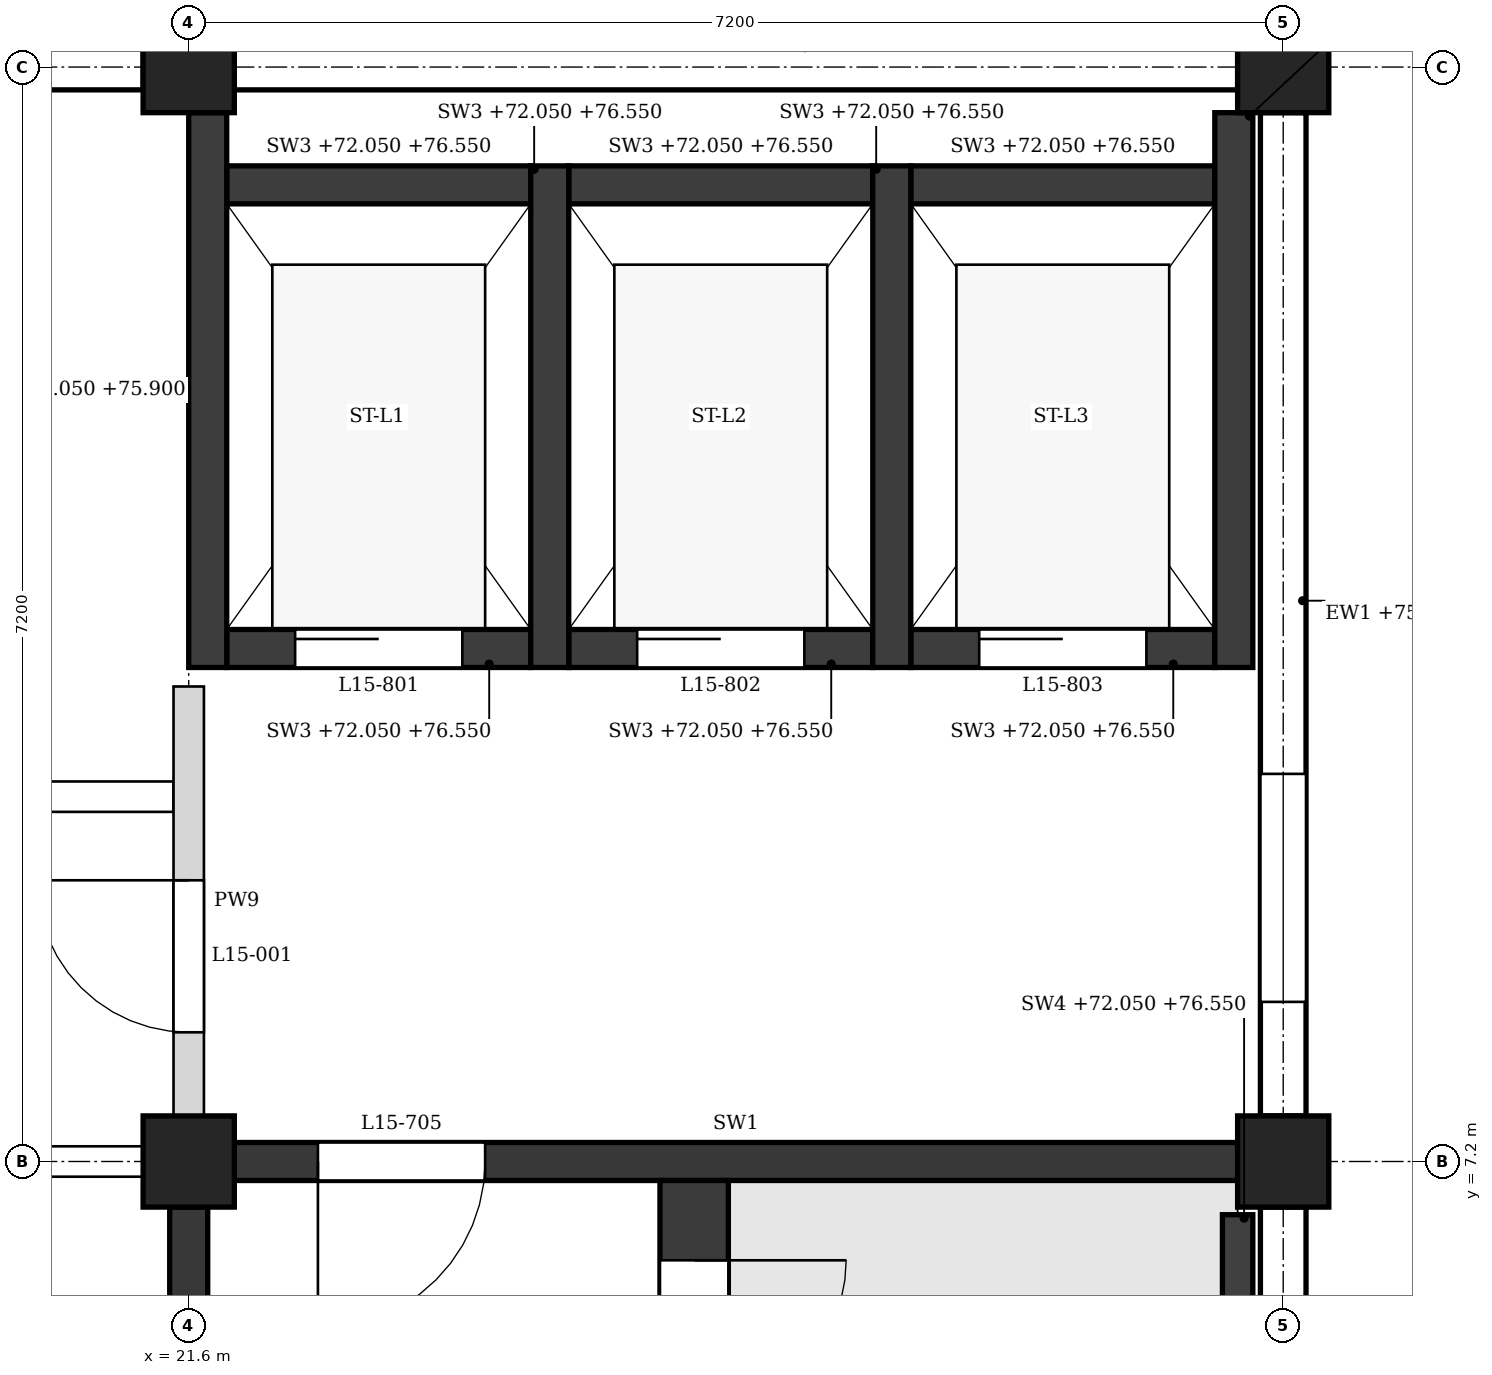
"""IFC4 building model, lengths in metres.
Left out: names, types, materials, properties, quantities, classifications, styles, units other than length and angle.
Written with IfcOpenShell. Run it as: python <this file> out.ifc"""

import sys

from ifc_helpers import new_model, si_unit, direction, frame, frame_2d, origin, origin_2d, place, context, subcontext, project, spatial, polyline, rectangle, outline, extrude, element, fill, save


model = new_model("IFC4")
c1 = context("Model", 3, precision=1e-05, world=origin(), true_north=direction((0.0, 1.0)))
c2 = subcontext(c1, "Body", "Model", "MODEL_VIEW")
j1 = project(units=[si_unit("LENGTHUNIT", "METRE"), si_unit("PLANEANGLEUNIT", "RADIAN")], contexts=[c1])
p1 = place(None, origin())
s1 = spatial("IfcSite", under=j1, at=p1, CompositionType="ELEMENT")
p2 = place(p1, origin())
s2 = spatial("IfcBuilding", under=s1, at=p2, CompositionType="ELEMENT")
p3 = place(p2, frame((0.0, 0.0, 72.3)))
s3 = spatial("IfcBuildingStorey", under=s2, at=p3, CompositionType="ELEMENT", Elevation=72.3)
for number, where, z_axis, x_axis in (
    (1, (21.6, 7.2, 0.0), (0.0, 0.0, 1.0), (1.0, 0.0, 0.0)),
    (2, (21.6, 14.4, 0.0), (0.0, 0.0, 1.0), (1.0, 0.0, 0.0)),
    (3, (28.8, 7.2, 0.0), (0.0, 0.0, 1.0), (1.0, 0.0, 0.0)),
    (4, (28.8, 14.4, 0.0), (0.0, 0.0, 1.0), (1.0, 0.0, 0.0)),
):
    element("IfcColumn", number, at=place(p3, frame(where, z_axis=z_axis, x_axis=x_axis)), inside=s3, PredefinedType="COLUMN", context=c2, shape_type="SweptSolid", body=[
        extrude(rectangle(XDim=0.6, YDim=0.6, at=origin_2d()), origin(), (0.0, 0.0, 1.0), 4.5),
    ])
p4 = place(p3, frame((28.8, 0.3, 0.0), z_axis=(0.0, 0.0, 1.0), x_axis=(0.0, 1.0, 0.0)))
e5 = element("IfcWall", 5, at=p4, inside=s3, PredefinedType="STANDARD", context=c2, shape_type="SweptSolid", body=[
    extrude(rectangle(XDim=6.6, YDim=0.3, at=frame_2d((3.3, 0.0))), origin(), (0.0, 0.0, 1.0), 3.65),
])
p5 = place(p4, frame((1.05, 0.0, 0.9)))
e6 = element("IfcOpeningElement", 6, at=p5, cuts=e5, PredefinedType="OPENING", context=c2, shape_type="SweptSolid", body=[
    extrude(outline(polyline([(0.0, 0.0), (0.9, 0.0), (0.9, 2.25), (0.45, 2.7), (0.0, 2.25), (0.0, 0.0)])), frame((0.0, 0.16, 0.0), z_axis=(0.0, -1.0, 0.0), x_axis=(1.0, 0.0, 0.0)), (0.0, 0.0, 1.0), 0.32),
])
p6 = place(p4, frame((4.65, 0.0, 0.9)))
e7 = element("IfcOpeningElement", 7, at=p6, cuts=e5, PredefinedType="OPENING", context=c2, shape_type="SweptSolid", body=[
    extrude(outline(polyline([(0.0, 0.0), (0.9, 0.0), (0.9, 2.25), (0.45, 2.7), (0.0, 2.25), (0.0, 0.0)])), frame((0.0, 0.16, 0.0), z_axis=(0.0, -1.0, 0.0), x_axis=(1.0, 0.0, 0.0)), (0.0, 0.0, 1.0), 0.32),
])
p7 = place(p3, frame((28.8, 7.5, 0.0), z_axis=(0.0, 0.0, 1.0), x_axis=(0.0, 1.0, 0.0)))
e8 = element("IfcWall", 8, at=p7, inside=s3, PredefinedType="STANDARD", context=c2, shape_type="SweptSolid", body=[
    extrude(rectangle(XDim=6.6, YDim=0.3, at=frame_2d((3.3, 0.0))), origin(), (0.0, 0.0, 1.0), 3.65),
])
p8 = place(p7, frame((0.75, 0.0, 0.9)))
e9 = element("IfcOpeningElement", 9, at=p8, cuts=e8, PredefinedType="OPENING", context=c2, shape_type="SweptSolid", body=[
    extrude(outline(polyline([(0.0, 0.0), (1.5, 0.0), (1.5, 1.95), (0.75, 2.7), (0.0, 1.95), (0.0, 0.0)])), frame((0.0, 0.16, 0.0), z_axis=(0.0, -1.0, 0.0), x_axis=(1.0, 0.0, 0.0)), (0.0, 0.0, 1.0), 0.32),
])
p9 = place(p3, frame((28.5, 14.4, 0.0), z_axis=(0.0, 0.0, 1.0), x_axis=(-1.0, 0.0, 0.0)))
e10 = element("IfcWall", 10, at=p9, inside=s3, PredefinedType="STANDARD", context=c2, shape_type="SweptSolid", body=[
    extrude(rectangle(XDim=6.6, YDim=0.3, at=frame_2d((3.3, 0.0))), origin(), (0.0, 0.0, 1.0), 3.65),
])
p10 = place(p3, frame((21.3, 14.4, 0.0), z_axis=(0.0, 0.0, 1.0), x_axis=(-1.0, 0.0, 0.0)))
e11 = element("IfcWall", 11, at=p10, inside=s3, PredefinedType="STANDARD", context=c2, shape_type="SweptSolid", body=[
    extrude(rectangle(XDim=6.6, YDim=0.3, at=frame_2d((3.3, 0.0))), origin(), (0.0, 0.0, 1.0), 3.65),
])
p11 = place(p10, frame((0.75, 0.0, 0.9)))
e12 = element("IfcOpeningElement", 12, at=p11, cuts=e11, PredefinedType="OPENING", context=c2, shape_type="SweptSolid", body=[
    extrude(outline(polyline([(0.0, 0.0), (1.5, 0.0), (1.5, 1.95), (0.75, 2.7), (0.0, 1.95), (0.0, 0.0)])), frame((0.0, 0.16, 0.0), z_axis=(0.0, -1.0, 0.0), x_axis=(1.0, 0.0, 0.0)), (0.0, 0.0, 1.0), 0.32),
])
p12 = place(p10, frame((4.35, 0.0, 0.9)))
e13 = element("IfcOpeningElement", 13, at=p12, cuts=e11, PredefinedType="OPENING", context=c2, shape_type="SweptSolid", body=[
    extrude(outline(polyline([(0.0, 0.0), (1.5, 0.0), (1.5, 1.95), (0.75, 2.7), (0.0, 1.95), (0.0, 0.0)])), frame((0.0, 0.16, 0.0), z_axis=(0.0, -1.0, 0.0), x_axis=(1.0, 0.0, 0.0)), (0.0, 0.0, 1.0), 0.32),
])
p13 = place(p3, frame((21.9, 7.2, 0.0), z_axis=(0.0, 0.0, 1.0), x_axis=(1.0, 0.0, 0.0)))
e14 = element("IfcWall", 14, at=p13, inside=s3, PredefinedType="SHEAR", context=c2, shape_type="SweptSolid", body=[
    extrude(rectangle(XDim=6.6, YDim=0.25, at=frame_2d((3.3, 0.0))), origin(), (0.0, 0.0, 1.0), 3.6),
])
p14 = place(p13, frame((0.55, 0.0, 0.0)))
e15 = element("IfcOpeningElement", 15, at=p14, cuts=e14, PredefinedType="OPENING", context=c2, shape_type="SweptSolid", body=[
    extrude(rectangle(XDim=1.1, YDim=2.1, at=frame_2d((0.55, 1.05))), frame((0.0, 0.135, 0.0), z_axis=(0.0, -1.0, 0.0), x_axis=(1.0, 0.0, 0.0)), (0.0, 0.0, 1.0), 0.27),
])
p15 = place(p3, frame((21.6, 0.3, 0.0), z_axis=(0.0, 0.0, 1.0), x_axis=(0.0, 1.0, 0.0)))
e16 = element("IfcWall", 16, at=p15, inside=s3, PredefinedType="SHEAR", context=c2, shape_type="SweptSolid", body=[
    extrude(rectangle(XDim=6.6, YDim=0.25, at=frame_2d((3.3, 0.0))), origin(), (0.0, 0.0, 1.0), 3.6),
])
p16 = place(p3, frame((28.5, 5.85, -0.25), z_axis=(0.0, 0.0, 1.0), x_axis=(0.0, 1.0, 0.0)))
e17 = element("IfcWall", 17, at=p16, inside=s3, PredefinedType="SHEAR", context=c2, shape_type="SweptSolid", body=[
    extrude(rectangle(XDim=1.0, YDim=0.2, at=frame_2d((0.5, 0.0))), origin(), (0.0, 0.0, 1.0), 4.5),
])
p17 = place(p3, frame((24.925, 0.15, 0.0), z_axis=(0.0, 0.0, 1.0), x_axis=(0.0, 1.0, 0.0)))
e18 = element("IfcWall", 18, at=p17, inside=s3, PredefinedType="SHEAR", context=c2, shape_type="SweptSolid", body=[
    extrude(rectangle(XDim=6.925, YDim=0.45, at=frame_2d((3.462, 0.0))), origin(), (0.0, 0.0, 1.0), 4.25),
])
p18 = place(p17, frame((5.4, 0.0, 0.0)))
e19 = element("IfcOpeningElement", 19, at=p18, cuts=e18, PredefinedType="OPENING", context=c2, shape_type="SweptSolid", body=[
    extrude(rectangle(XDim=1.0, YDim=2.1, at=frame_2d((0.5, 1.05))), frame((0.0, 0.235, 0.0), z_axis=(0.0, -1.0, 0.0), x_axis=(1.0, 0.0, 0.0)), (0.0, 0.0, 1.0), 0.47),
])
p19 = place(p3, frame((21.725, 10.45, -0.25), z_axis=(0.0, 0.0, 1.0), x_axis=(0.0, 1.0, 0.0)))
e20 = element("IfcWall", 20, at=p19, inside=s3, PredefinedType="SHEAR", context=c2, shape_type="SweptSolid", body=[
    extrude(rectangle(XDim=3.65, YDim=0.25, at=frame_2d((1.825, 0.0))), origin(), (0.0, 0.0, 1.0), 3.85),
])
for number, where, z_axis, x_axis in (
    (21, (23.975, 10.45, -0.25), (0.0, 0.0, 1.0), (0.0, 1.0, 0.0)),
    (22, (26.225, 10.45, -0.25), (0.0, 0.0, 1.0), (0.0, 1.0, 0.0)),
):
    element("IfcWall", number, at=place(p3, frame(where, z_axis=z_axis, x_axis=x_axis)), inside=s3, PredefinedType="SHEAR", context=c2, shape_type="SweptSolid", body=[
        extrude(rectangle(XDim=3.3, YDim=0.25, at=frame_2d((1.65, 0.0))), origin(), (0.0, 0.0, 1.0), 4.5),
    ])
p20 = place(p3, frame((28.475, 10.45, -0.25), z_axis=(0.0, 0.0, 1.0), x_axis=(0.0, 1.0, 0.0)))
e23 = element("IfcWall", 23, at=p20, inside=s3, PredefinedType="SHEAR", context=c2, shape_type="SweptSolid", body=[
    extrude(rectangle(XDim=3.65, YDim=0.25, at=frame_2d((1.825, 0.0))), origin(), (0.0, 0.0, 1.0), 4.5),
])
p21 = place(p3, frame((21.85, 10.575, -0.25), z_axis=(0.0, 0.0, 1.0), x_axis=(1.0, 0.0, 0.0)))
e24 = element("IfcWall", 24, at=p21, inside=s3, PredefinedType="SHEAR", context=c2, shape_type="SweptSolid", body=[
    extrude(rectangle(XDim=2.0, YDim=0.25, at=frame_2d((1.0, 0.0))), origin(), (0.0, 0.0, 1.0), 4.5),
])
p22 = place(p21, frame((0.45, 0.0, 0.25)))
e25 = element("IfcOpeningElement", 25, at=p22, cuts=e24, PredefinedType="OPENING", context=c2, shape_type="SweptSolid", body=[
    extrude(rectangle(XDim=1.1, YDim=2.1, at=frame_2d((0.55, 1.05))), frame((0.0, 0.135, 0.0), z_axis=(0.0, -1.0, 0.0), x_axis=(1.0, 0.0, 0.0)), (0.0, 0.0, 1.0), 0.27),
])
p23 = place(p3, frame((21.85, 13.625, -0.25), z_axis=(0.0, 0.0, 1.0), x_axis=(1.0, 0.0, 0.0)))
e26 = element("IfcWall", 26, at=p23, inside=s3, PredefinedType="SHEAR", context=c2, shape_type="SweptSolid", body=[
    extrude(rectangle(XDim=2.0, YDim=0.25, at=frame_2d((1.0, 0.0))), origin(), (0.0, 0.0, 1.0), 4.5),
])
p24 = place(p3, frame((24.1, 10.575, -0.25), z_axis=(0.0, 0.0, 1.0), x_axis=(1.0, 0.0, 0.0)))
e27 = element("IfcWall", 27, at=p24, inside=s3, PredefinedType="SHEAR", context=c2, shape_type="SweptSolid", body=[
    extrude(rectangle(XDim=2.0, YDim=0.25, at=frame_2d((1.0, 0.0))), origin(), (0.0, 0.0, 1.0), 4.5),
])
p25 = place(p24, frame((0.45, 0.0, 0.25)))
e28 = element("IfcOpeningElement", 28, at=p25, cuts=e27, PredefinedType="OPENING", context=c2, shape_type="SweptSolid", body=[
    extrude(rectangle(XDim=1.1, YDim=2.1, at=frame_2d((0.55, 1.05))), frame((0.0, 0.135, 0.0), z_axis=(0.0, -1.0, 0.0), x_axis=(1.0, 0.0, 0.0)), (0.0, 0.0, 1.0), 0.27),
])
p26 = place(p3, frame((24.1, 13.625, -0.25), z_axis=(0.0, 0.0, 1.0), x_axis=(1.0, 0.0, 0.0)))
e29 = element("IfcWall", 29, at=p26, inside=s3, PredefinedType="SHEAR", context=c2, shape_type="SweptSolid", body=[
    extrude(rectangle(XDim=2.0, YDim=0.25, at=frame_2d((1.0, 0.0))), origin(), (0.0, 0.0, 1.0), 4.5),
])
p27 = place(p3, frame((26.35, 10.575, -0.25), z_axis=(0.0, 0.0, 1.0), x_axis=(1.0, 0.0, 0.0)))
e30 = element("IfcWall", 30, at=p27, inside=s3, PredefinedType="SHEAR", context=c2, shape_type="SweptSolid", body=[
    extrude(rectangle(XDim=2.0, YDim=0.25, at=frame_2d((1.0, 0.0))), origin(), (0.0, 0.0, 1.0), 4.5),
])
p28 = place(p27, frame((0.45, 0.0, 0.25)))
e31 = element("IfcOpeningElement", 31, at=p28, cuts=e30, PredefinedType="OPENING", context=c2, shape_type="SweptSolid", body=[
    extrude(rectangle(XDim=1.1, YDim=2.1, at=frame_2d((0.55, 1.05))), frame((0.0, 0.135, 0.0), z_axis=(0.0, -1.0, 0.0), x_axis=(1.0, 0.0, 0.0)), (0.0, 0.0, 1.0), 0.27),
])
p29 = place(p3, frame((26.35, 13.625, -0.25), z_axis=(0.0, 0.0, 1.0), x_axis=(1.0, 0.0, 0.0)))
e32 = element("IfcWall", 32, at=p29, inside=s3, PredefinedType="SHEAR", context=c2, shape_type="SweptSolid", body=[
    extrude(rectangle(XDim=2.0, YDim=0.25, at=frame_2d((1.0, 0.0))), origin(), (0.0, 0.0, 1.0), 4.5),
])
p30 = place(p3, frame((14.7, 7.2, 0.0), z_axis=(0.0, 0.0, 1.0), x_axis=(1.0, 0.0, 0.0)))
e33 = element("IfcWall", 33, at=p30, inside=s3, PredefinedType="PARTITIONING", context=c2, shape_type="SweptSolid", body=[
    extrude(rectangle(XDim=6.6, YDim=0.2, at=frame_2d((3.3, 0.0))), origin(), (0.0, 0.0, 1.0), 3.6),
])
p31 = place(p30, frame((4.45, 0.0, 0.0)))
e34 = element("IfcOpeningElement", 34, at=p31, cuts=e33, PredefinedType="OPENING", context=c2, shape_type="SweptSolid", body=[
    extrude(rectangle(XDim=1.0, YDim=2.1, at=frame_2d((0.5, 1.05))), frame((0.0, 0.11, 0.0), z_axis=(0.0, -1.0, 0.0), x_axis=(1.0, 0.0, 0.0)), (0.0, 0.0, 1.0), 0.22),
])
p32 = place(p3, frame((3.5, 9.6, 0.0), z_axis=(0.0, 0.0, 1.0), x_axis=(1.0, 0.0, 0.0)))
e35 = element("IfcWall", 35, at=p32, inside=s3, PredefinedType="PARTITIONING", context=c2, shape_type="SweptSolid", body=[
    extrude(outline(polyline([(0.0, 0.0), (18.0, 0.0), (18.0, 3.6), (17.9, 3.6), (17.9, 4.25), (11.1, 4.25), (11.1, 3.6), (10.7, 3.6), (10.7, 4.25), (3.9, 4.25), (3.9, 3.6), (3.5, 3.6), (3.5, 4.25), (0.0, 4.25), (0.0, 0.0)])), frame((0.0, 0.1, 0.0), z_axis=(0.0, -1.0, 0.0), x_axis=(1.0, 0.0, 0.0)), (0.0, 0.0, 1.0), 0.2),
])
p33 = place(p32, frame((15.75, 0.0, 0.0)))
e36 = element("IfcOpeningElement", 36, at=p33, cuts=e35, PredefinedType="OPENING", context=c2, shape_type="SweptSolid", body=[
    extrude(rectangle(XDim=1.0, YDim=2.1, at=frame_2d((0.5, 1.05))), frame((0.0, 0.11, 0.0), z_axis=(0.0, -1.0, 0.0), x_axis=(1.0, 0.0, 0.0)), (0.0, 0.0, 1.0), 0.22),
])
p34 = place(p32, frame((4.5, 0.0, 0.0)))
e37 = element("IfcOpeningElement", 37, at=p34, cuts=e35, PredefinedType="OPENING", context=c2, shape_type="SweptSolid", body=[
    extrude(rectangle(XDim=2.0, YDim=2.1, at=frame_2d((1.0, 1.05))), frame((0.0, 0.11, 0.0), z_axis=(0.0, -1.0, 0.0), x_axis=(1.0, 0.0, 0.0)), (0.0, 0.0, 1.0), 0.22),
])
p35 = place(p32, frame((11.7, 0.0, 0.0)))
e38 = element("IfcOpeningElement", 38, at=p35, cuts=e35, PredefinedType="OPENING", context=c2, shape_type="SweptSolid", body=[
    extrude(rectangle(XDim=2.0, YDim=2.1, at=frame_2d((1.0, 1.05))), frame((0.0, 0.11, 0.0), z_axis=(0.0, -1.0, 0.0), x_axis=(1.0, 0.0, 0.0)), (0.0, 0.0, 1.0), 0.22),
])
p36 = place(p3, frame((21.6, 7.5, 0.0), z_axis=(0.0, 0.0, 1.0), x_axis=(0.0, 1.0, 0.0)))
e39 = element("IfcWall", 39, at=p36, inside=s3, PredefinedType="PARTITIONING", context=c2, shape_type="SweptSolid", body=[
    extrude(rectangle(XDim=2.825, YDim=0.2, at=frame_2d((1.413, 0.0))), origin(), (0.0, 0.0, 1.0), 3.6),
])
p37 = place(p36, frame((0.55, 0.0, 0.0)))
e40 = element("IfcOpeningElement", 40, at=p37, cuts=e39, PredefinedType="OPENING", context=c2, shape_type="SweptSolid", body=[
    extrude(rectangle(XDim=1.0, YDim=2.1, at=frame_2d((0.5, 1.05))), frame((0.0, 0.11, 0.0), z_axis=(0.0, -1.0, 0.0), x_axis=(1.0, 0.0, 0.0)), (0.0, 0.0, 1.0), 0.22),
])
p38 = place(p8, origin())
e41 = element("IfcWindow", 41, at=p38, inside=s3, PartitioningType="SINGLE_PANEL", PredefinedType="WINDOW", context=c2, shape_type="SweptSolid", body=[
    extrude(outline(polyline([(0.0, 0.0), (1.5, 0.0), (1.5, 1.95), (0.75, 2.7), (0.0, 1.95), (0.0, 0.0)])), frame((0.0, 0.03, 0.0), z_axis=(0.0, -1.0, 0.0), x_axis=(1.0, 0.0, 0.0)), (0.0, 0.0, 1.0), 0.06),
])
fill(e9, e41)
p39 = place(p18, frame((1.0, 0.0, 0.0), z_axis=(0.0, 0.0, 1.0), x_axis=(-1.0, 0.0, 0.0)))
e42 = element("IfcDoor", 42, at=p39, inside=s3, OperationType="SINGLE_SWING_LEFT", PredefinedType="DOOR", context=c2, shape_type="SweptSolid", body=[
    extrude(rectangle(XDim=1.0, YDim=2.1, at=frame_2d((0.5, 1.05))), frame((0.0, 0.025, 0.0), z_axis=(0.0, -1.0, 0.0), x_axis=(1.0, 0.0, 0.0)), (0.0, 0.0, 1.0), 0.05),
])
fill(e19, e42)
p40 = place(p14, frame((1.1, 0.0, 0.0), z_axis=(0.0, 0.0, 1.0), x_axis=(-1.0, 0.0, 0.0)))
e43 = element("IfcDoor", 43, at=p40, inside=s3, OperationType="SINGLE_SWING_RIGHT", PredefinedType="DOOR", context=c2, shape_type="SweptSolid", body=[
    extrude(rectangle(XDim=1.1, YDim=2.1, at=frame_2d((0.55, 1.05))), frame((0.0, 0.025, 0.0), z_axis=(0.0, -1.0, 0.0), x_axis=(1.0, 0.0, 0.0)), (0.0, 0.0, 1.0), 0.05),
])
fill(e15, e43)
p41 = place(p22, origin())
e44 = element("IfcDoor", 44, at=p41, inside=s3, OperationType="SLIDING_TO_LEFT", PredefinedType="DOOR", context=c2, shape_type="SweptSolid", body=[
    extrude(rectangle(XDim=1.1, YDim=2.1, at=frame_2d((0.55, 1.05))), frame((0.0, 0.025, 0.0), z_axis=(0.0, -1.0, 0.0), x_axis=(1.0, 0.0, 0.0)), (0.0, 0.0, 1.0), 0.05),
])
fill(e25, e44)
p42 = place(p25, origin())
e45 = element("IfcDoor", 45, at=p42, inside=s3, OperationType="SLIDING_TO_LEFT", PredefinedType="DOOR", context=c2, shape_type="SweptSolid", body=[
    extrude(rectangle(XDim=1.1, YDim=2.1, at=frame_2d((0.55, 1.05))), frame((0.0, 0.025, 0.0), z_axis=(0.0, -1.0, 0.0), x_axis=(1.0, 0.0, 0.0)), (0.0, 0.0, 1.0), 0.05),
])
fill(e28, e45)
p43 = place(p28, origin())
e46 = element("IfcDoor", 46, at=p43, inside=s3, OperationType="SLIDING_TO_LEFT", PredefinedType="DOOR", context=c2, shape_type="SweptSolid", body=[
    extrude(rectangle(XDim=1.1, YDim=2.1, at=frame_2d((0.55, 1.05))), frame((0.0, 0.025, 0.0), z_axis=(0.0, -1.0, 0.0), x_axis=(1.0, 0.0, 0.0)), (0.0, 0.0, 1.0), 0.05),
])
fill(e31, e46)
p44 = place(p37, origin())
e47 = element("IfcDoor", 47, at=p44, inside=s3, OperationType="SINGLE_SWING_RIGHT", PredefinedType="DOOR", context=c2, shape_type="SweptSolid", body=[
    extrude(rectangle(XDim=1.0, YDim=2.1, at=frame_2d((0.5, 1.05))), frame((0.0, 0.025, 0.0), z_axis=(0.0, -1.0, 0.0), x_axis=(1.0, 0.0, 0.0)), (0.0, 0.0, 1.0), 0.05),
])
fill(e40, e47)
save(model, sys.argv[1])
